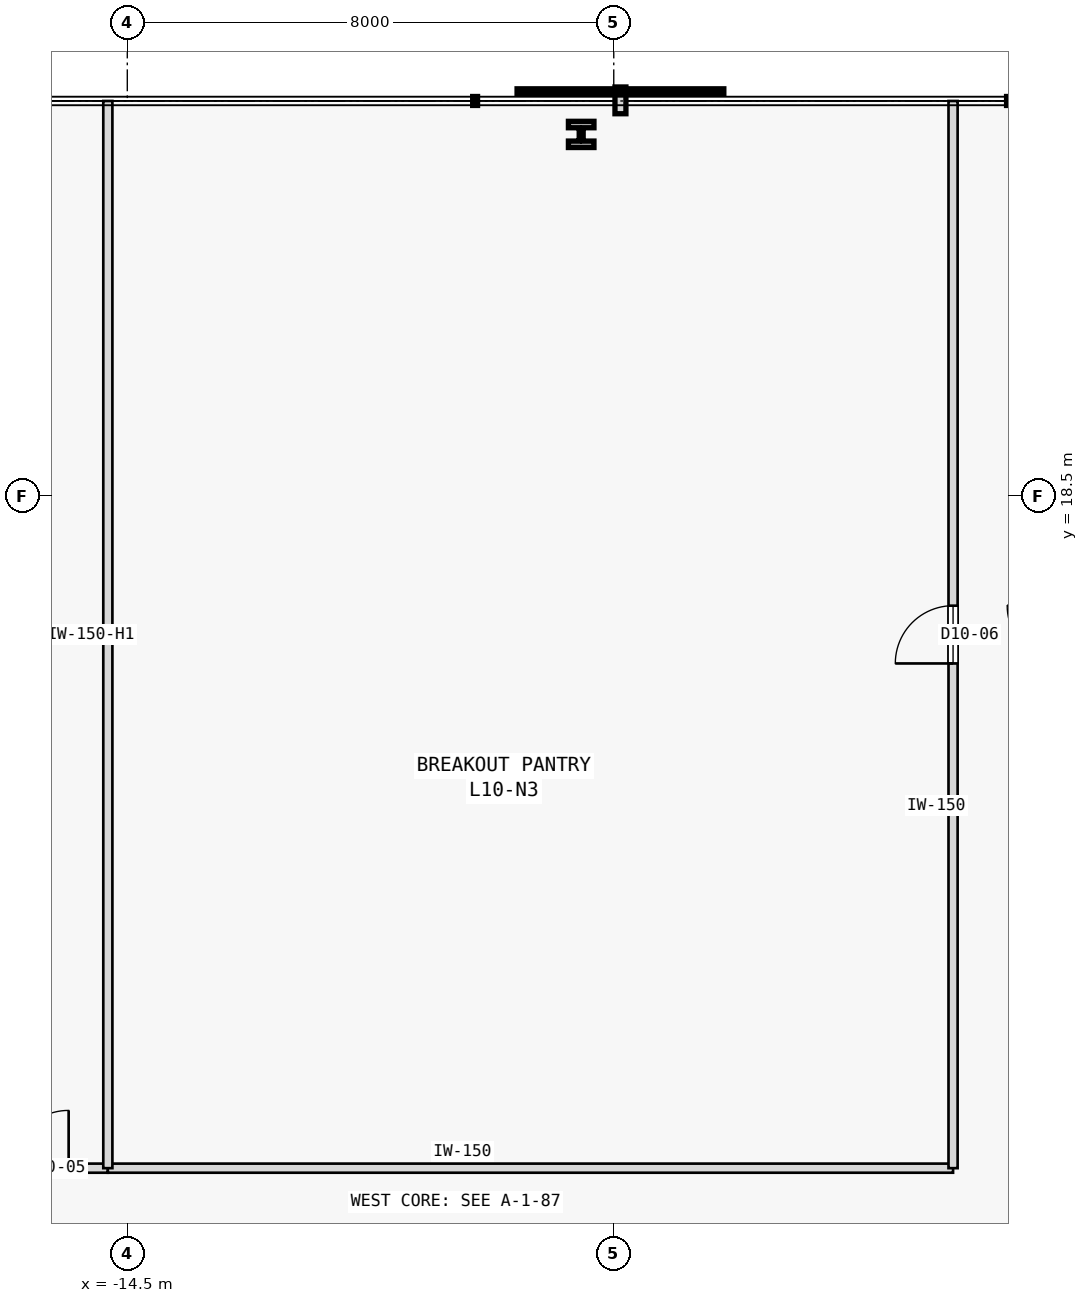
"""IFC4 building model, lengths in metres.
Left out: names, types, materials, properties, quantities, classifications, styles, units other than length and angle.
Written with IfcOpenShell. Run it as: python <this file> out.ifc"""

import sys

from ifc_helpers import new_model, si_unit, direction, frame, frame_2d, origin, origin_2d, place, context, subcontext, project, spatial, rectangle, i_section, extrude, element, fill, save


model = new_model("IFC4")
c1 = context("Model", 3, precision=1e-05, world=origin(), true_north=direction((0.0, 1.0)))
c2 = subcontext(c1, "Body", "Model", "MODEL_VIEW")
j1 = project(units=[si_unit("LENGTHUNIT", "METRE"), si_unit("PLANEANGLEUNIT", "RADIAN")], contexts=[c1])
p1 = place(None, origin())
s1 = spatial("IfcSite", under=j1, at=p1, CompositionType="ELEMENT")
p2 = place(p1, origin())
s2 = spatial("IfcBuilding", under=s1, at=p2, CompositionType="ELEMENT")
p3 = place(p2, frame((0.0, 0.0, 44.6)))
s3 = spatial("IfcBuildingStorey", under=s2, at=p3, CompositionType="ELEMENT", Elevation=44.6)
p4 = place(p3, frame((-7.036, 24.45, 0.0), z_axis=(0.0, 0.0, 1.0), x_axis=(1.0, 0.0, 0.0)))
e1 = element("IfcColumn", 1, at=p4, inside=s3, PredefinedType="COLUMN", context=c2, shape_type="SweptSolid", body=[
    extrude(i_section(OverallWidth=0.42, OverallDepth=0.431, WebThickness=0.065, FlangeThickness=0.106, FilletRadius=0.015, at=origin_2d()), origin(), (0.0, 0.0, 1.0), 3.8),
])
p5 = place(p3, frame((-17.059, 7.45, 0.0), z_axis=(0.0, 0.0, 1.0), x_axis=(1.0, 0.0, 0.0)))
e2 = element("IfcWall", 2, at=p5, inside=s3, PredefinedType="PARTITIONING", context=c2, shape_type="SweptSolid", body=[
    extrude(rectangle(XDim=2.239, YDim=0.15, at=frame_2d((1.12, 0.0))), origin(), (0.0, 0.0, 1.0), 3.575),
])
p6 = place(p5, frame((0.645, 0.0, 0.0)))
e3 = element("IfcOpeningElement", 3, at=p6, cuts=e2, PredefinedType="OPENING", context=c2, shape_type="SweptSolid", body=[
    extrude(rectangle(XDim=0.95, YDim=2.15, at=frame_2d((0.475, 1.075))), frame((0.0, 0.085, 0.0), z_axis=(0.0, -1.0, 0.0), x_axis=(1.0, 0.0, 0.0)), (0.0, 0.0, 1.0), 0.17),
])
p7 = place(p3, frame((-14.82, 7.45, 0.0), z_axis=(0.0, 0.0, 1.0), x_axis=(1.0, 0.0, 0.0)))
e4 = element("IfcWall", 4, at=p7, inside=s3, PredefinedType="PARTITIONING", context=c2, shape_type="SweptSolid", body=[
    extrude(rectangle(XDim=13.9, YDim=0.15, at=frame_2d((6.95, 0.0))), origin(), (0.0, 0.0, 1.0), 3.575),
])
p8 = place(p3, frame((-0.92, 7.45, 0.0), z_axis=(0.0, 0.0, 1.0), x_axis=(0.0, 1.0, 0.0)))
e5 = element("IfcWall", 5, at=p8, inside=s3, PredefinedType="PARTITIONING", context=c2, shape_type="SweptSolid", body=[
    extrude(rectangle(XDim=17.55, YDim=0.15, at=frame_2d((8.775, 0.0))), origin(), (0.0, 0.0, 1.0), 3.575),
])
p9 = place(p8, frame((8.3, 0.0, 0.0)))
e6 = element("IfcOpeningElement", 6, at=p9, cuts=e5, PredefinedType="OPENING", context=c2, shape_type="SweptSolid", body=[
    extrude(rectangle(XDim=0.95, YDim=2.15, at=frame_2d((0.475, 1.075))), frame((0.0, 0.085, 0.0), z_axis=(0.0, -1.0, 0.0), x_axis=(1.0, 0.0, 0.0)), (0.0, 0.0, 1.0), 0.17),
])
p10 = place(p3, frame((-14.82, 7.45, 0.0), z_axis=(0.0, 0.0, 1.0), x_axis=(0.0, 1.0, 0.0)))
e7 = element("IfcWall", 7, at=p10, inside=s3, PredefinedType="PARTITIONING", context=c2, shape_type="SweptSolid", body=[
    extrude(rectangle(XDim=17.55, YDim=0.15, at=frame_2d((8.775, 0.0))), origin(), (0.0, 0.0, 1.0), 3.125),
])
p11 = place(p6, origin())
e8 = element("IfcDoor", 8, at=p11, inside=s3, OperationType="SINGLE_SWING_RIGHT", PredefinedType="DOOR", context=c2, shape_type="SweptSolid", body=[
    extrude(rectangle(XDim=0.95, YDim=2.15, at=frame_2d((0.475, 1.075))), frame((0.0, 0.025, 0.0), z_axis=(0.0, -1.0, 0.0), x_axis=(1.0, 0.0, 0.0)), (0.0, 0.0, 1.0), 0.05),
])
fill(e3, e8)
p12 = place(p9, origin())
e9 = element("IfcDoor", 9, at=p12, inside=s3, OperationType="SINGLE_SWING_LEFT", PredefinedType="DOOR", context=c2, shape_type="SweptSolid", body=[
    extrude(rectangle(XDim=0.95, YDim=2.15, at=frame_2d((0.475, 1.075))), frame((0.0, 0.025, 0.0), z_axis=(0.0, -1.0, 0.0), x_axis=(1.0, 0.0, 0.0)), (0.0, 0.0, 1.0), 0.05),
])
fill(e6, e9)
save(model, sys.argv[1])
